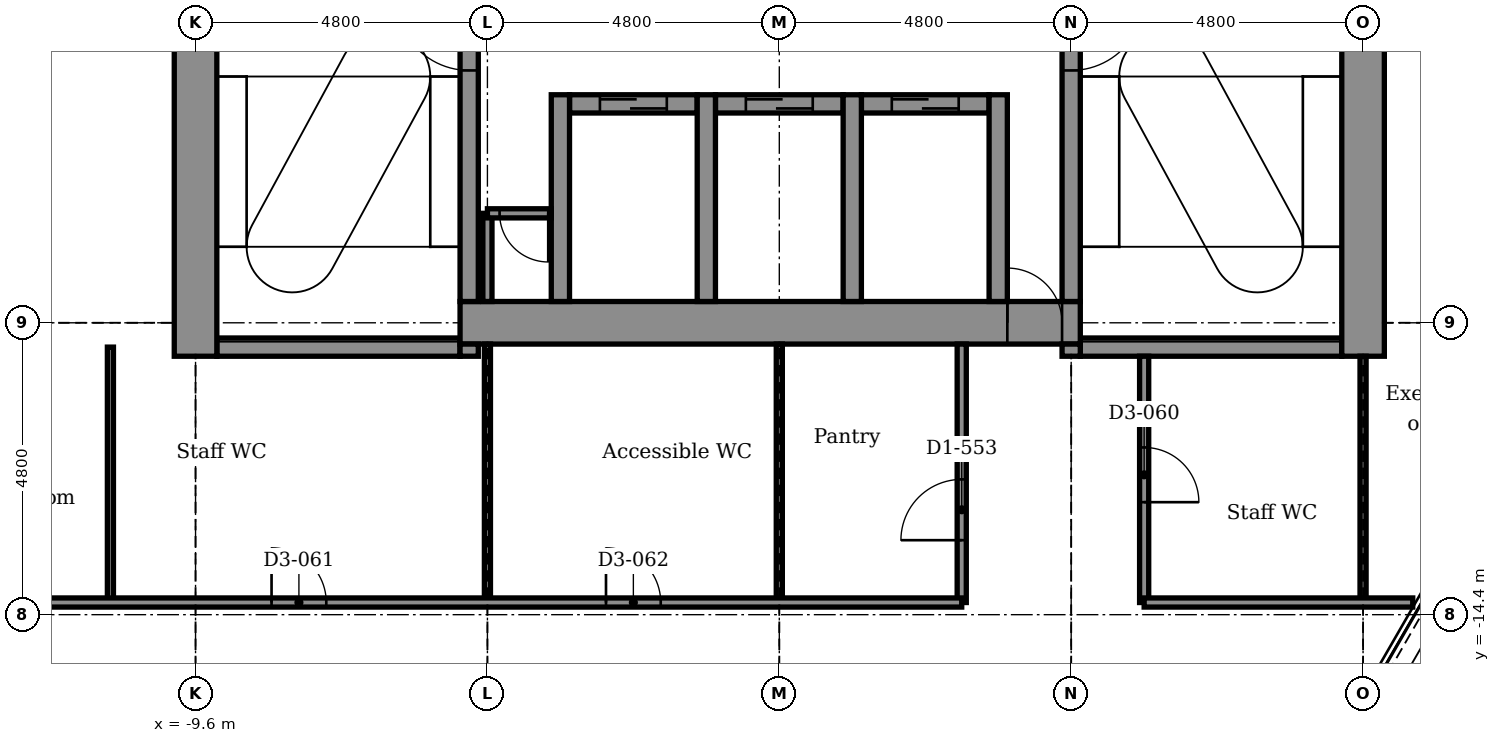
"""IFC4 building model, lengths in metres.
Left out: names, types, materials, properties, quantities, classifications, styles, units other than length and angle.
Written with IfcOpenShell. Run it as: python <this file> out.ifc"""

import sys

from ifc_helpers import new_model, si_unit, direction, frame, frame_2d, origin, place, context, subcontext, project, spatial, rectangle, extrude, element, fill, save


model = new_model("IFC4")
c1 = context("Model", 3, precision=1e-05, world=origin(), true_north=direction((0.0, 1.0)))
c2 = subcontext(c1, "Body", "Model", "MODEL_VIEW")
j1 = project(units=[si_unit("LENGTHUNIT", "METRE"), si_unit("PLANEANGLEUNIT", "RADIAN")], contexts=[c1])
p1 = place(None, origin())
s1 = spatial("IfcSite", under=j1, at=p1, CompositionType="ELEMENT")
p2 = place(p1, origin())
s2 = spatial("IfcBuilding", under=s1, at=p2, CompositionType="ELEMENT")
p3 = place(p2, frame((0.0, 0.0, 197.3)))
s3 = spatial("IfcBuildingStorey", under=s2, at=p3, CompositionType="ELEMENT", Elevation=197.3)
p4 = place(p3, frame((-9.25, -10.0, -0.15), z_axis=(0.0, 0.0, 1.0), x_axis=(1.0, 0.0, 0.0)))
e1 = element("IfcWall", 1, at=p4, inside=s3, PredefinedType="STANDARD", context=c2, shape_type="SweptSolid", body=[
    extrude(rectangle(XDim=4.0, YDim=0.3, at=frame_2d((2.0, 0.0))), origin(), (0.0, 0.0, 1.0), 3.9),
])
p5 = place(p3, frame((4.95, -10.0, -0.15), z_axis=(0.0, 0.0, 1.0), x_axis=(1.0, 0.0, 0.0)))
e2 = element("IfcWall", 2, at=p5, inside=s3, PredefinedType="STANDARD", context=c2, shape_type="SweptSolid", body=[
    extrude(rectangle(XDim=4.3, YDim=0.3, at=frame_2d((2.15, 0.0))), origin(), (0.0, 0.0, 1.0), 3.9),
])
p6 = place(p3, frame((-5.25, -9.6, -0.15), z_axis=(0.0, 0.0, 1.0), x_axis=(1.0, 0.0, 0.0)))
e3 = element("IfcWall", 3, at=p6, inside=s3, PredefinedType="SHEAR", context=c2, shape_type="SweptSolid", body=[
    extrude(rectangle(XDim=10.2, YDim=0.7, at=frame_2d((5.1, 0.0))), origin(), (0.0, 0.0, 1.0), 3.9),
])
p7 = place(p6, frame((9.0, 0.0, 0.15)))
e4 = element("IfcOpeningElement", 4, at=p7, cuts=e3, PredefinedType="OPENING", context=c2, shape_type="SweptSolid", body=[
    extrude(rectangle(XDim=0.9, YDim=2.1, at=frame_2d((0.45, 1.05))), frame((0.0, 0.36, 0.0), z_axis=(0.0, -1.0, 0.0), x_axis=(1.0, 0.0, 0.0)), (0.0, 0.0, 1.0), 0.72),
])
p8 = place(p3, frame((-3.45, -6.0, -0.15), z_axis=(0.0, 0.0, 1.0), x_axis=(1.0, 0.0, 0.0)))
e5 = element("IfcWall", 5, at=p8, inside=s3, PredefinedType="STANDARD", context=c2, shape_type="SweptSolid", body=[
    extrude(rectangle(XDim=2.1, YDim=0.3, at=frame_2d((1.05, 0.0))), origin(), (0.0, 0.0, 1.0), 3.9),
])
p9 = place(p8, frame((0.5, 0.0, 0.15)))
e6 = element("IfcOpeningElement", 6, at=p9, cuts=e5, PredefinedType="OPENING", context=c2, shape_type="SweptSolid", body=[
    extrude(rectangle(XDim=1.1, YDim=2.1, at=frame_2d((0.55, 1.05))), frame((0.0, 0.16, 0.0), z_axis=(0.0, -1.0, 0.0), x_axis=(1.0, 0.0, 0.0)), (0.0, 0.0, 1.0), 0.32),
])
p10 = place(p3, frame((-1.05, -6.0, -0.15), z_axis=(0.0, 0.0, 1.0), x_axis=(1.0, 0.0, 0.0)))
e7 = element("IfcWall", 7, at=p10, inside=s3, PredefinedType="STANDARD", context=c2, shape_type="SweptSolid", body=[
    extrude(rectangle(XDim=2.1, YDim=0.3, at=frame_2d((1.05, 0.0))), origin(), (0.0, 0.0, 1.0), 3.9),
])
p11 = place(p10, frame((0.5, 0.0, 0.15)))
e8 = element("IfcOpeningElement", 8, at=p11, cuts=e7, PredefinedType="OPENING", context=c2, shape_type="SweptSolid", body=[
    extrude(rectangle(XDim=1.1, YDim=2.1, at=frame_2d((0.55, 1.05))), frame((0.0, 0.16, 0.0), z_axis=(0.0, -1.0, 0.0), x_axis=(1.0, 0.0, 0.0)), (0.0, 0.0, 1.0), 0.32),
])
p12 = place(p3, frame((1.35, -6.0, -0.15), z_axis=(0.0, 0.0, 1.0), x_axis=(1.0, 0.0, 0.0)))
e9 = element("IfcWall", 9, at=p12, inside=s3, PredefinedType="STANDARD", context=c2, shape_type="SweptSolid", body=[
    extrude(rectangle(XDim=2.1, YDim=0.3, at=frame_2d((1.05, 0.0))), origin(), (0.0, 0.0, 1.0), 3.9),
])
p13 = place(p12, frame((0.5, 0.0, 0.15)))
e10 = element("IfcOpeningElement", 10, at=p13, cuts=e9, PredefinedType="OPENING", context=c2, shape_type="SweptSolid", body=[
    extrude(rectangle(XDim=1.1, YDim=2.1, at=frame_2d((0.55, 1.05))), frame((0.0, 0.16, 0.0), z_axis=(0.0, -1.0, 0.0), x_axis=(1.0, 0.0, 0.0)), (0.0, 0.0, 1.0), 0.32),
])
p14 = place(p3, frame((-9.6, -10.15, -0.15), z_axis=(0.0, 0.0, 1.0), x_axis=(0.0, 1.0, 0.0)))
e11 = element("IfcWall", 11, at=p14, inside=s3, PredefinedType="SHEAR", context=c2, shape_type="SweptSolid", body=[
    extrude(rectangle(XDim=7.6, YDim=0.7, at=frame_2d((3.8, 0.0))), origin(), (0.0, 0.0, 1.0), 3.9),
])
p15 = place(p3, frame((-5.1, -10.15, -0.15), z_axis=(0.0, 0.0, 1.0), x_axis=(0.0, 1.0, 0.0)))
e12 = element("IfcWall", 12, at=p15, inside=s3, PredefinedType="STANDARD", context=c2, shape_type="SweptSolid", body=[
    extrude(rectangle(XDim=0.2, YDim=0.3, at=frame_2d((0.1, 0.0))), origin(), (0.0, 0.0, 1.0), 3.9),
])
p16 = place(p3, frame((-5.1, -9.25, -0.15), z_axis=(0.0, 0.0, 1.0), x_axis=(0.0, 1.0, 0.0)))
e13 = element("IfcWall", 13, at=p16, inside=s3, PredefinedType="STANDARD", context=c2, shape_type="SweptSolid", body=[
    extrude(rectangle(XDim=7.0, YDim=0.3, at=frame_2d((3.5, 0.0))), origin(), (0.0, 0.0, 1.0), 3.9),
])
p17 = place(p16, frame((3.8, 0.0, 0.15)))
e14 = element("IfcOpeningElement", 14, at=p17, cuts=e13, PredefinedType="OPENING", context=c2, shape_type="SweptSolid", body=[
    extrude(rectangle(XDim=1.2, YDim=2.1, at=frame_2d((0.6, 1.05))), frame((0.0, 0.16, 0.0), z_axis=(0.0, -1.0, 0.0), x_axis=(1.0, 0.0, 0.0)), (0.0, 0.0, 1.0), 0.32),
])
for number, where, z_axis, x_axis in (
    (15, (-3.6, -9.25, -0.15), (0.0, 0.0, 1.0), (0.0, 1.0, 0.0)),
    (16, (-1.2, -9.25, -0.15), (0.0, 0.0, 1.0), (0.0, 1.0, 0.0)),
    (17, (1.2, -9.25, -0.15), (0.0, 0.0, 1.0), (0.0, 1.0, 0.0)),
    (18, (3.6, -9.25, -0.15), (0.0, 0.0, 1.0), (0.0, 1.0, 0.0)),
):
    element("IfcWall", number, at=place(p3, frame(where, z_axis=z_axis, x_axis=x_axis)), inside=s3, PredefinedType="STANDARD", context=c2, shape_type="SweptSolid", body=[
        extrude(rectangle(XDim=3.4, YDim=0.3, at=frame_2d((1.7, 0.0))), origin(), (0.0, 0.0, 1.0), 3.9),
    ])
p18 = place(p3, frame((4.8, -10.15, -0.15), z_axis=(0.0, 0.0, 1.0), x_axis=(0.0, 1.0, 0.0)))
e19 = element("IfcWall", 19, at=p18, inside=s3, PredefinedType="STANDARD", context=c2, shape_type="SweptSolid", body=[
    extrude(rectangle(XDim=0.2, YDim=0.3, at=frame_2d((0.1, 0.0))), origin(), (0.0, 0.0, 1.0), 3.9),
])
p19 = place(p3, frame((4.8, -9.25, -0.15), z_axis=(0.0, 0.0, 1.0), x_axis=(0.0, 1.0, 0.0)))
e20 = element("IfcWall", 20, at=p19, inside=s3, PredefinedType="STANDARD", context=c2, shape_type="SweptSolid", body=[
    extrude(rectangle(XDim=7.0, YDim=0.3, at=frame_2d((3.5, 0.0))), origin(), (0.0, 0.0, 1.0), 3.9),
])
p20 = place(p19, frame((3.8, 0.0, 0.15)))
e21 = element("IfcOpeningElement", 21, at=p20, cuts=e20, PredefinedType="OPENING", context=c2, shape_type="SweptSolid", body=[
    extrude(rectangle(XDim=1.2, YDim=2.1, at=frame_2d((0.6, 1.05))), frame((0.0, 0.16, 0.0), z_axis=(0.0, -1.0, 0.0), x_axis=(1.0, 0.0, 0.0)), (0.0, 0.0, 1.0), 0.32),
])
p21 = place(p3, frame((9.6, -10.15, -0.15), z_axis=(0.0, 0.0, 1.0), x_axis=(0.0, 1.0, 0.0)))
e22 = element("IfcWall", 22, at=p21, inside=s3, PredefinedType="SHEAR", context=c2, shape_type="SweptSolid", body=[
    extrude(rectangle(XDim=20.1, YDim=0.7, at=frame_2d((10.05, 0.0))), origin(), (0.0, 0.0, 1.0), 3.9),
])
p22 = place(p3, frame((9.6, -14.2, 0.0), z_axis=(0.0, 0.0, 1.0), x_axis=(0.0, 1.0, 0.0)))
e23 = element("IfcWall", 23, at=p22, inside=s3, PredefinedType="PARTITIONING", context=c2, shape_type="SweptSolid", body=[
    extrude(rectangle(XDim=4.05, YDim=0.1, at=frame_2d((2.025, 0.0))), origin(), (0.0, 0.0, 1.0), 3.066),
])
p23 = place(p3, frame((6.0, -14.2, 0.0), z_axis=(0.0, 0.0, 1.0), x_axis=(0.0, 1.0, 0.0)))
e24 = element("IfcWall", 24, at=p23, inside=s3, PredefinedType="PARTITIONING", context=c2, shape_type="SweptSolid", body=[
    extrude(rectangle(XDim=4.05, YDim=0.15, at=frame_2d((2.025, 0.0))), origin(), (0.0, 0.0, 1.0), 3.75),
])
p24 = place(p23, frame((1.65, 0.0, 0.0)))
e25 = element("IfcOpeningElement", 25, at=p24, cuts=e24, PredefinedType="OPENING", context=c2, shape_type="SweptSolid", body=[
    extrude(rectangle(XDim=0.9, YDim=2.1, at=frame_2d((0.45, 1.05))), frame((0.0, 0.085, 0.0), z_axis=(0.0, -1.0, 0.0), x_axis=(1.0, 0.0, 0.0)), (0.0, 0.0, 1.0), 0.17),
])
p25 = place(p3, frame((3.0, -14.2, 0.0), z_axis=(0.0, 0.0, 1.0), x_axis=(0.0, 1.0, 0.0)))
e26 = element("IfcWall", 26, at=p25, inside=s3, PredefinedType="PARTITIONING", context=c2, shape_type="SweptSolid", body=[
    extrude(rectangle(XDim=4.25, YDim=0.15, at=frame_2d((2.125, 0.0))), origin(), (0.0, 0.0, 1.0), 3.75),
])
p26 = place(p25, frame((1.025, 0.0, 0.0)))
e27 = element("IfcOpeningElement", 27, at=p26, cuts=e26, PredefinedType="OPENING", context=c2, shape_type="SweptSolid", body=[
    extrude(rectangle(XDim=1.0, YDim=2.1, at=frame_2d((0.5, 1.05))), frame((0.0, 0.085, 0.0), z_axis=(0.0, -1.0, 0.0), x_axis=(1.0, 0.0, 0.0)), (0.0, 0.0, 1.0), 0.17),
])
for number, where, z_axis, x_axis in (
    (28, (0.0, -14.2, 0.0), (0.0, 0.0, 1.0), (0.0, 1.0, 0.0)),
    (29, (-4.8, -14.2, 0.0), (0.0, 0.0, 1.0), (0.0, 1.0, 0.0)),
):
    element("IfcWall", number, at=place(p3, frame(where, z_axis=z_axis, x_axis=x_axis)), inside=s3, PredefinedType="PARTITIONING", context=c2, shape_type="SweptSolid", body=[
        extrude(rectangle(XDim=4.25, YDim=0.1, at=frame_2d((2.125, 0.0))), origin(), (0.0, 0.0, 1.0), 3.066),
    ])
p27 = place(p3, frame((-4.8, -9.25, 0.0), z_axis=(0.0, 0.0, 1.0), x_axis=(0.0, 1.0, 0.0)))
e30 = element("IfcWall", 30, at=p27, inside=s3, PredefinedType="PARTITIONING", context=c2, shape_type="SweptSolid", body=[
    extrude(rectangle(XDim=1.45, YDim=0.15, at=frame_2d((0.725, 0.0))), origin(), (0.0, 0.0, 1.0), 3.75),
])
p28 = place(p3, frame((-11.0, -14.2, 0.0), z_axis=(0.0, 0.0, 1.0), x_axis=(0.0, 1.0, 0.0)))
e31 = element("IfcWall", 31, at=p28, inside=s3, PredefinedType="PARTITIONING", context=c2, shape_type="SweptSolid", body=[
    extrude(rectangle(XDim=4.2, YDim=0.1, at=frame_2d((2.1, 0.0))), origin(), (0.0, 0.0, 1.0), 3.75),
])
p29 = place(p3, frame((-16.93, -14.2, 0.0), z_axis=(0.0, 0.0, 1.0), x_axis=(1.0, 0.0, 0.0)))
e32 = element("IfcWall", 32, at=p29, inside=s3, PredefinedType="PARTITIONING", context=c2, shape_type="SweptSolid", body=[
    extrude(rectangle(XDim=19.93, YDim=0.15, at=frame_2d((9.965, 0.0))), origin(), (0.0, 0.0, 1.0), 3.75),
])
p30 = place(p29, frame((8.58, 0.0, 0.0)))
e33 = element("IfcOpeningElement", 33, at=p30, cuts=e32, PredefinedType="OPENING", context=c2, shape_type="SweptSolid", body=[
    extrude(rectangle(XDim=0.9, YDim=2.1, at=frame_2d((0.45, 1.05))), frame((0.0, 0.085, 0.0), z_axis=(0.0, -1.0, 0.0), x_axis=(1.0, 0.0, 0.0)), (0.0, 0.0, 1.0), 0.17),
])
p31 = place(p29, frame((14.08, 0.0, 0.0)))
e34 = element("IfcOpeningElement", 34, at=p31, cuts=e32, PredefinedType="OPENING", context=c2, shape_type="SweptSolid", body=[
    extrude(rectangle(XDim=0.9, YDim=2.1, at=frame_2d((0.45, 1.05))), frame((0.0, 0.085, 0.0), z_axis=(0.0, -1.0, 0.0), x_axis=(1.0, 0.0, 0.0)), (0.0, 0.0, 1.0), 0.17),
])
p32 = place(p3, frame((6.0, -14.2, 0.0), z_axis=(0.0, 0.0, 1.0), x_axis=(1.0, 0.0, 0.0)))
e35 = element("IfcWall", 35, at=p32, inside=s3, PredefinedType="PARTITIONING", context=c2, shape_type="SweptSolid", body=[
    extrude(rectangle(XDim=4.417, YDim=0.15, at=frame_2d((2.208, 0.0))), origin(), (0.0, 0.0, 1.0), 3.75),
])
p33 = place(p3, frame((-4.8, -7.8, 0.0), z_axis=(0.0, 0.0, 1.0), x_axis=(1.0, 0.0, 0.0)))
e36 = element("IfcWall", 36, at=p33, inside=s3, PredefinedType="PARTITIONING", context=c2, shape_type="SweptSolid", body=[
    extrude(rectangle(XDim=1.05, YDim=0.15, at=frame_2d((0.525, 0.0))), origin(), (0.0, 0.0, 1.0), 3.75),
])
p34 = place(p33, frame((0.2, 0.0, 0.0)))
e37 = element("IfcOpeningElement", 37, at=p34, cuts=e36, PredefinedType="OPENING", context=c2, shape_type="SweptSolid", body=[
    extrude(rectangle(XDim=0.8, YDim=2.1, at=frame_2d((0.4, 1.05))), frame((0.0, 0.085, 0.0), z_axis=(0.0, -1.0, 0.0), x_axis=(1.0, 0.0, 0.0)), (0.0, 0.0, 1.0), 0.17),
])
p35 = place(p34, frame((0.8, 0.0, 0.0), z_axis=(0.0, 0.0, 1.0), x_axis=(-1.0, 0.0, 0.0)))
e38 = element("IfcDoor", 38, at=p35, inside=s3, OperationType="SINGLE_SWING_RIGHT", PredefinedType="DOOR", context=c2, shape_type="SweptSolid", body=[
    extrude(rectangle(XDim=0.8, YDim=2.1, at=frame_2d((0.4, 1.05))), frame((0.0, 0.025, 0.0), z_axis=(0.0, -1.0, 0.0), x_axis=(1.0, 0.0, 0.0)), (0.0, 0.0, 1.0), 0.05),
])
fill(e37, e38)
p36 = place(p24, frame((0.9, 0.0, 0.0), z_axis=(0.0, 0.0, 1.0), x_axis=(-1.0, 0.0, 0.0)))
e39 = element("IfcDoor", 39, at=p36, inside=s3, OperationType="SINGLE_SWING_LEFT", PredefinedType="DOOR", context=c2, shape_type="SweptSolid", body=[
    extrude(rectangle(XDim=0.9, YDim=2.1, at=frame_2d((0.45, 1.05))), frame((0.0, 0.025, 0.0), z_axis=(0.0, -1.0, 0.0), x_axis=(1.0, 0.0, 0.0)), (0.0, 0.0, 1.0), 0.05),
])
fill(e25, e39)
p37 = place(p30, origin())
e40 = element("IfcDoor", 40, at=p37, inside=s3, OperationType="SINGLE_SWING_LEFT", PredefinedType="DOOR", context=c2, shape_type="SweptSolid", body=[
    extrude(rectangle(XDim=0.9, YDim=2.1, at=frame_2d((0.45, 1.05))), frame((0.0, 0.025, 0.0), z_axis=(0.0, -1.0, 0.0), x_axis=(1.0, 0.0, 0.0)), (0.0, 0.0, 1.0), 0.05),
])
fill(e33, e40)
p38 = place(p31, origin())
e41 = element("IfcDoor", 41, at=p38, inside=s3, OperationType="SINGLE_SWING_LEFT", PredefinedType="DOOR", context=c2, shape_type="SweptSolid", body=[
    extrude(rectangle(XDim=0.9, YDim=2.1, at=frame_2d((0.45, 1.05))), frame((0.0, 0.025, 0.0), z_axis=(0.0, -1.0, 0.0), x_axis=(1.0, 0.0, 0.0)), (0.0, 0.0, 1.0), 0.05),
])
fill(e34, e41)
p39 = place(p26, origin())
e42 = element("IfcDoor", 42, at=p39, inside=s3, OperationType="SINGLE_SWING_LEFT", PredefinedType="DOOR", context=c2, shape_type="SweptSolid", body=[
    extrude(rectangle(XDim=1.0, YDim=2.1, at=frame_2d((0.5, 1.05))), frame((0.0, 0.025, 0.0), z_axis=(0.0, -1.0, 0.0), x_axis=(1.0, 0.0, 0.0)), (0.0, 0.0, 1.0), 0.05),
])
fill(e27, e42)
p40 = place(p9, origin())
e43 = element("IfcDoor", 43, at=p40, inside=s3, OperationType="DOUBLE_DOOR_SLIDING", PredefinedType="DOOR", context=c2, shape_type="SweptSolid", body=[
    extrude(rectangle(XDim=1.1, YDim=2.1, at=frame_2d((0.55, 1.05))), frame((0.0, 0.025, 0.0), z_axis=(0.0, -1.0, 0.0), x_axis=(1.0, 0.0, 0.0)), (0.0, 0.0, 1.0), 0.05),
])
fill(e6, e43)
p41 = place(p11, origin())
e44 = element("IfcDoor", 44, at=p41, inside=s3, OperationType="DOUBLE_DOOR_SLIDING", PredefinedType="DOOR", context=c2, shape_type="SweptSolid", body=[
    extrude(rectangle(XDim=1.1, YDim=2.1, at=frame_2d((0.55, 1.05))), frame((0.0, 0.025, 0.0), z_axis=(0.0, -1.0, 0.0), x_axis=(1.0, 0.0, 0.0)), (0.0, 0.0, 1.0), 0.05),
])
fill(e8, e44)
p42 = place(p13, origin())
e45 = element("IfcDoor", 45, at=p42, inside=s3, OperationType="DOUBLE_DOOR_SLIDING", PredefinedType="DOOR", context=c2, shape_type="SweptSolid", body=[
    extrude(rectangle(XDim=1.1, YDim=2.1, at=frame_2d((0.55, 1.05))), frame((0.0, 0.025, 0.0), z_axis=(0.0, -1.0, 0.0), x_axis=(1.0, 0.0, 0.0)), (0.0, 0.0, 1.0), 0.05),
])
fill(e10, e45)
p43 = place(p17, origin())
e46 = element("IfcDoor", 46, at=p43, inside=s3, OperationType="SINGLE_SWING_RIGHT", PredefinedType="DOOR", context=c2, shape_type="SweptSolid", body=[
    extrude(rectangle(XDim=1.2, YDim=2.1, at=frame_2d((0.6, 1.05))), frame((0.0, 0.025, 0.0), z_axis=(0.0, -1.0, 0.0), x_axis=(1.0, 0.0, 0.0)), (0.0, 0.0, 1.0), 0.05),
])
fill(e14, e46)
p44 = place(p20, frame((1.2, 0.0, 0.0), z_axis=(0.0, 0.0, 1.0), x_axis=(-1.0, 0.0, 0.0)))
e47 = element("IfcDoor", 47, at=p44, inside=s3, OperationType="SINGLE_SWING_RIGHT", PredefinedType="DOOR", context=c2, shape_type="SweptSolid", body=[
    extrude(rectangle(XDim=1.2, YDim=2.1, at=frame_2d((0.6, 1.05))), frame((0.0, 0.025, 0.0), z_axis=(0.0, -1.0, 0.0), x_axis=(1.0, 0.0, 0.0)), (0.0, 0.0, 1.0), 0.05),
])
fill(e21, e47)
p45 = place(p7, origin())
e48 = element("IfcDoor", 48, at=p45, inside=s3, OperationType="SINGLE_SWING_LEFT", PredefinedType="DOOR", context=c2, shape_type="SweptSolid", body=[
    extrude(rectangle(XDim=0.9, YDim=2.1, at=frame_2d((0.45, 1.05))), frame((0.0, 0.025, 0.0), z_axis=(0.0, -1.0, 0.0), x_axis=(1.0, 0.0, 0.0)), (0.0, 0.0, 1.0), 0.05),
])
fill(e4, e48)
save(model, sys.argv[1])
